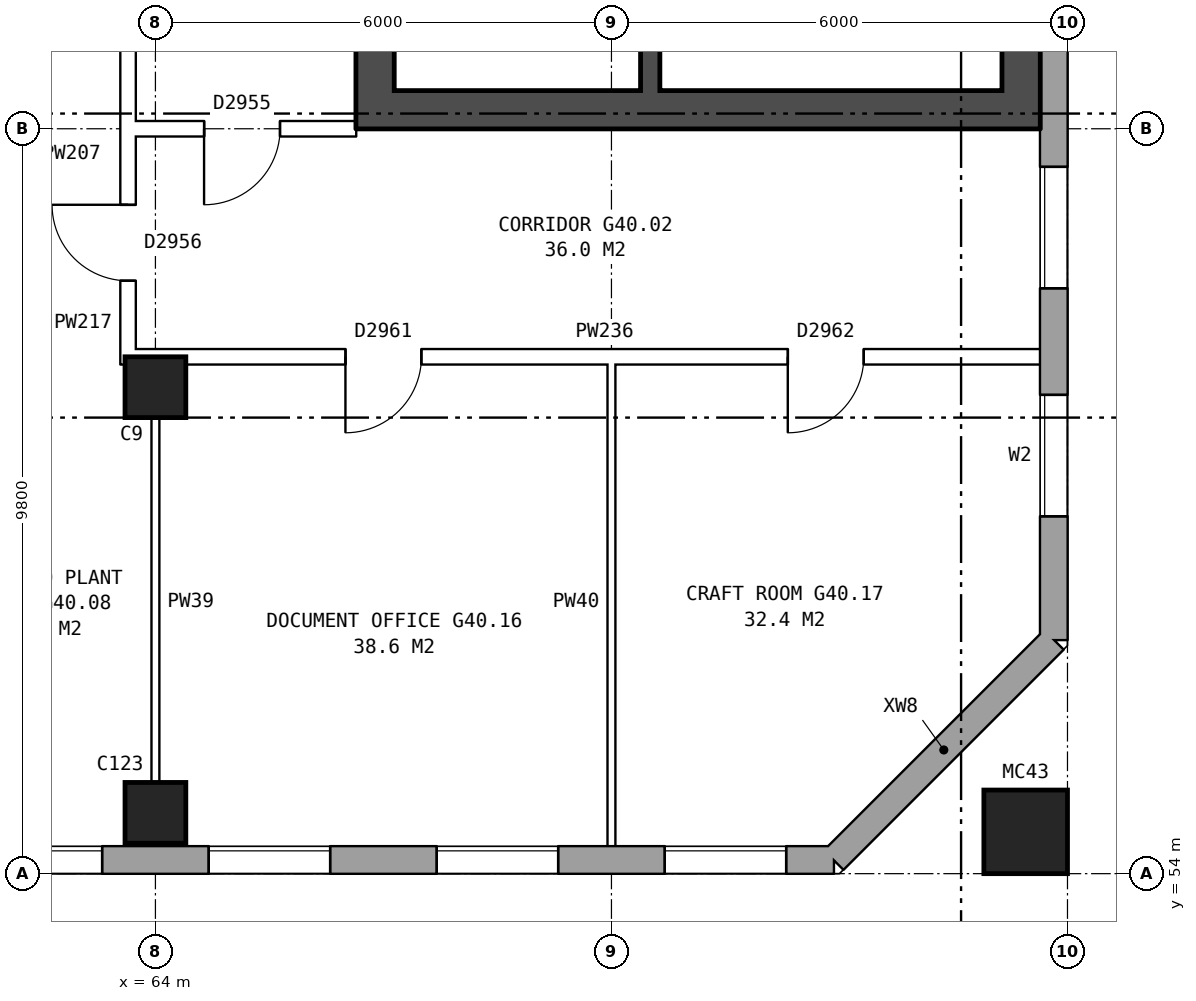
"""IFC4 building model, lengths in metres.
Left out: names, types, materials, properties, quantities, classifications, styles, units other than length and angle.
Written with IfcOpenShell. Run it as: python <this file> out.ifc"""

import sys

from ifc_helpers import new_model, si_unit, direction, frame, frame_2d, origin, origin_2d, place, context, subcontext, project, spatial, rectangle, hollow_rectangle, extrude, element, fill, save


model = new_model("IFC4")
c1 = context("Model", 3, precision=1e-05, world=origin(), true_north=direction((0.0, 1.0)))
c2 = subcontext(c1, "Body", "Model", "MODEL_VIEW")
j1 = project(units=[si_unit("LENGTHUNIT", "METRE"), si_unit("PLANEANGLEUNIT", "RADIAN")], contexts=[c1])
p1 = place(None, origin())
s1 = spatial("IfcSite", under=j1, at=p1, CompositionType="ELEMENT")
p2 = place(p1, origin())
s2 = spatial("IfcBuilding", under=s1, at=p2, CompositionType="ELEMENT")
p3 = place(p2, frame((0.0, 0.0, 142.3)))
s3 = spatial("IfcBuildingStorey", under=s2, at=p3, CompositionType="ELEMENT", Elevation=142.3)
for number, where, z_axis, x_axis in (
    (1, (64.0, 54.8, 0.0), (0.0, 0.0, 1.0), (1.0, 0.0, 0.0)),
    (2, (64.0, 60.4, 0.0), (0.0, 0.0, 1.0), (1.0, 0.0, 0.0)),
):
    element("IfcColumn", number, at=place(p3, frame(where, z_axis=z_axis, x_axis=x_axis)), inside=s3, PredefinedType="COLUMN", context=c2, shape_type="SweptSolid", body=[
        extrude(rectangle(XDim=0.8, YDim=0.8, at=origin_2d()), origin(), (0.0, 0.0, 1.0), 5.6),
    ])
p4 = place(p3, frame((75.45, 54.55, 0.0), z_axis=(0.0, 0.0, 1.0), x_axis=(1.0, 0.0, 0.0)))
e3 = element("IfcColumn", 3, at=p4, inside=s3, PredefinedType="COLUMN", context=c2, shape_type="SweptSolid", body=[
    extrude(hollow_rectangle(XDim=1.1, YDim=1.1, WallThickness=0.06, at=origin_2d()), origin(), (0.0, 0.0, 1.0), 6.2),
])
p5 = place(p3, frame((31.575, 54.18, 0.0), z_axis=(0.0, 0.0, 1.0), x_axis=(1.0, 0.0, 0.0)))
e4 = element("IfcWall", 4, at=p5, inside=s3, PredefinedType="STANDARD", context=c2, shape_type="SweptSolid", body=[
    extrude(rectangle(XDim=41.351, YDim=0.36, at=frame_2d((20.675, 0.0))), origin(), (0.0, 0.0, 1.0), 5.6),
])
p6 = place(p5, frame((3.125, 0.0, 0.15)))
e5 = element("IfcOpeningElement", 5, at=p6, cuts=e4, PredefinedType="OPENING", context=c2, shape_type="SweptSolid", body=[
    extrude(rectangle(XDim=1.6, YDim=2.4, at=frame_2d((0.8, 1.2))), frame((0.0, 0.19, 0.0), z_axis=(0.0, -1.0, 0.0), x_axis=(1.0, 0.0, 0.0)), (0.0, 0.0, 1.0), 0.38),
])
p7 = place(p5, frame((6.125, 0.0, 0.15)))
e6 = element("IfcOpeningElement", 6, at=p7, cuts=e4, PredefinedType="OPENING", context=c2, shape_type="SweptSolid", body=[
    extrude(rectangle(XDim=1.6, YDim=2.4, at=frame_2d((0.8, 1.2))), frame((0.0, 0.19, 0.0), z_axis=(0.0, -1.0, 0.0), x_axis=(1.0, 0.0, 0.0)), (0.0, 0.0, 1.0), 0.38),
])
p8 = place(p5, frame((9.125, 0.0, 0.15)))
e7 = element("IfcOpeningElement", 7, at=p8, cuts=e4, PredefinedType="OPENING", context=c2, shape_type="SweptSolid", body=[
    extrude(rectangle(XDim=1.6, YDim=2.4, at=frame_2d((0.8, 1.2))), frame((0.0, 0.19, 0.0), z_axis=(0.0, -1.0, 0.0), x_axis=(1.0, 0.0, 0.0)), (0.0, 0.0, 1.0), 0.38),
])
p9 = place(p5, frame((12.125, 0.0, 0.15)))
e8 = element("IfcOpeningElement", 8, at=p9, cuts=e4, PredefinedType="OPENING", context=c2, shape_type="SweptSolid", body=[
    extrude(rectangle(XDim=1.6, YDim=2.4, at=frame_2d((0.8, 1.2))), frame((0.0, 0.19, 0.0), z_axis=(0.0, -1.0, 0.0), x_axis=(1.0, 0.0, 0.0)), (0.0, 0.0, 1.0), 0.38),
])
p10 = place(p5, frame((15.125, 0.0, 0.15)))
e9 = element("IfcOpeningElement", 9, at=p10, cuts=e4, PredefinedType="OPENING", context=c2, shape_type="SweptSolid", body=[
    extrude(rectangle(XDim=1.6, YDim=2.4, at=frame_2d((0.8, 1.2))), frame((0.0, 0.19, 0.0), z_axis=(0.0, -1.0, 0.0), x_axis=(1.0, 0.0, 0.0)), (0.0, 0.0, 1.0), 0.38),
])
p11 = place(p5, frame((18.125, 0.0, 0.15)))
e10 = element("IfcOpeningElement", 10, at=p11, cuts=e4, PredefinedType="OPENING", context=c2, shape_type="SweptSolid", body=[
    extrude(rectangle(XDim=1.6, YDim=2.4, at=frame_2d((0.8, 1.2))), frame((0.0, 0.19, 0.0), z_axis=(0.0, -1.0, 0.0), x_axis=(1.0, 0.0, 0.0)), (0.0, 0.0, 1.0), 0.38),
])
p12 = place(p5, frame((21.125, 0.0, 0.15)))
e11 = element("IfcOpeningElement", 11, at=p12, cuts=e4, PredefinedType="OPENING", context=c2, shape_type="SweptSolid", body=[
    extrude(rectangle(XDim=1.6, YDim=2.4, at=frame_2d((0.8, 1.2))), frame((0.0, 0.19, 0.0), z_axis=(0.0, -1.0, 0.0), x_axis=(1.0, 0.0, 0.0)), (0.0, 0.0, 1.0), 0.38),
])
p13 = place(p5, frame((24.125, 0.0, 0.15)))
e12 = element("IfcOpeningElement", 12, at=p13, cuts=e4, PredefinedType="OPENING", context=c2, shape_type="SweptSolid", body=[
    extrude(rectangle(XDim=1.6, YDim=2.4, at=frame_2d((0.8, 1.2))), frame((0.0, 0.19, 0.0), z_axis=(0.0, -1.0, 0.0), x_axis=(1.0, 0.0, 0.0)), (0.0, 0.0, 1.0), 0.38),
])
p14 = place(p5, frame((27.125, 0.0, 0.15)))
e13 = element("IfcOpeningElement", 13, at=p14, cuts=e4, PredefinedType="OPENING", context=c2, shape_type="SweptSolid", body=[
    extrude(rectangle(XDim=1.6, YDim=2.4, at=frame_2d((0.8, 1.2))), frame((0.0, 0.19, 0.0), z_axis=(0.0, -1.0, 0.0), x_axis=(1.0, 0.0, 0.0)), (0.0, 0.0, 1.0), 0.38),
])
p15 = place(p5, frame((30.125, 0.0, 0.15)))
e14 = element("IfcOpeningElement", 14, at=p15, cuts=e4, PredefinedType="OPENING", context=c2, shape_type="SweptSolid", body=[
    extrude(rectangle(XDim=1.6, YDim=2.4, at=frame_2d((0.8, 1.2))), frame((0.0, 0.19, 0.0), z_axis=(0.0, -1.0, 0.0), x_axis=(1.0, 0.0, 0.0)), (0.0, 0.0, 1.0), 0.38),
])
p16 = place(p5, frame((33.125, 0.0, 0.15)))
e15 = element("IfcOpeningElement", 15, at=p16, cuts=e4, PredefinedType="OPENING", context=c2, shape_type="SweptSolid", body=[
    extrude(rectangle(XDim=1.6, YDim=2.4, at=frame_2d((0.8, 1.2))), frame((0.0, 0.19, 0.0), z_axis=(0.0, -1.0, 0.0), x_axis=(1.0, 0.0, 0.0)), (0.0, 0.0, 1.0), 0.38),
])
p17 = place(p5, frame((36.125, 0.0, 0.15)))
e16 = element("IfcOpeningElement", 16, at=p17, cuts=e4, PredefinedType="OPENING", context=c2, shape_type="SweptSolid", body=[
    extrude(rectangle(XDim=1.6, YDim=2.4, at=frame_2d((0.8, 1.2))), frame((0.0, 0.19, 0.0), z_axis=(0.0, -1.0, 0.0), x_axis=(1.0, 0.0, 0.0)), (0.0, 0.0, 1.0), 0.38),
])
p18 = place(p5, frame((39.125, 0.0, 0.15)))
e17 = element("IfcOpeningElement", 17, at=p18, cuts=e4, PredefinedType="OPENING", context=c2, shape_type="SweptSolid", body=[
    extrude(rectangle(XDim=1.6, YDim=2.4, at=frame_2d((0.8, 1.2))), frame((0.0, 0.19, 0.0), z_axis=(0.0, -1.0, 0.0), x_axis=(1.0, 0.0, 0.0)), (0.0, 0.0, 1.0), 0.38),
])
p19 = place(p3, frame((72.925, 54.18, 0.0), z_axis=(0.0, 0.0, 1.0), x_axis=(0.707106781187, 0.707106781187, 0.0)))
e18 = element("IfcWall", 18, at=p19, inside=s3, PredefinedType="STANDARD", context=c2, shape_type="SweptSolid", body=[
    extrude(rectangle(XDim=4.094, YDim=0.36, at=frame_2d((2.047, 0.0))), origin(), (0.0, 0.0, 1.0), 5.6),
])
p20 = place(p3, frame((75.82, 57.075, 0.0), z_axis=(0.0, 0.0, 1.0), x_axis=(0.0, 1.0, 0.0)))
e19 = element("IfcWall", 19, at=p20, inside=s3, PredefinedType="STANDARD", context=c2, shape_type="SweptSolid", body=[
    extrude(rectangle(XDim=25.851, YDim=0.36, at=frame_2d((12.925, 0.0))), origin(), (0.0, 0.0, 1.0), 5.6),
])
p21 = place(p20, frame((1.625, 0.0, 0.15)))
e20 = element("IfcOpeningElement", 20, at=p21, cuts=e19, PredefinedType="OPENING", context=c2, shape_type="SweptSolid", body=[
    extrude(rectangle(XDim=1.6, YDim=2.4, at=frame_2d((0.8, 1.2))), frame((0.0, 0.19, 0.0), z_axis=(0.0, -1.0, 0.0), x_axis=(1.0, 0.0, 0.0)), (0.0, 0.0, 1.0), 0.38),
])
p22 = place(p20, frame((4.625, 0.0, 0.15)))
e21 = element("IfcOpeningElement", 21, at=p22, cuts=e19, PredefinedType="OPENING", context=c2, shape_type="SweptSolid", body=[
    extrude(rectangle(XDim=1.6, YDim=2.4, at=frame_2d((0.8, 1.2))), frame((0.0, 0.19, 0.0), z_axis=(0.0, -1.0, 0.0), x_axis=(1.0, 0.0, 0.0)), (0.0, 0.0, 1.0), 0.38),
])
p23 = place(p20, frame((19.625, 0.0, 0.15)))
e22 = element("IfcOpeningElement", 22, at=p23, cuts=e19, PredefinedType="OPENING", context=c2, shape_type="SweptSolid", body=[
    extrude(rectangle(XDim=1.6, YDim=2.4, at=frame_2d((0.8, 1.2))), frame((0.0, 0.19, 0.0), z_axis=(0.0, -1.0, 0.0), x_axis=(1.0, 0.0, 0.0)), (0.0, 0.0, 1.0), 0.38),
])
p24 = place(p20, frame((22.625, 0.0, 0.15)))
e23 = element("IfcOpeningElement", 23, at=p24, cuts=e19, PredefinedType="OPENING", context=c2, shape_type="SweptSolid", body=[
    extrude(rectangle(XDim=1.6, YDim=2.4, at=frame_2d((0.8, 1.2))), frame((0.0, 0.19, 0.0), z_axis=(0.0, -1.0, 0.0), x_axis=(1.0, 0.0, 0.0)), (0.0, 0.0, 1.0), 0.38),
])
p25 = place(p3, frame((66.89, 63.8, 0.0), z_axis=(0.0, 0.0, 1.0), x_axis=(0.0, 1.0, 0.0)))
e24 = element("IfcWall", 24, at=p25, inside=s3, PredefinedType="SHEAR", context=c2, shape_type="SweptSolid", body=[
    extrude(rectangle(XDim=12.4, YDim=0.5, at=frame_2d((6.2, 0.0))), origin(), (0.0, 0.0, 1.0), 5.6),
])
p26 = place(p25, frame((1.325, 0.0, 0.0)))
e25 = element("IfcOpeningElement", 25, at=p26, cuts=e24, PredefinedType="OPENING", context=c2, shape_type="SweptSolid", body=[
    extrude(rectangle(XDim=1.1, YDim=2.1, at=frame_2d((0.55, 1.05))), frame((0.0, 0.26, 0.0), z_axis=(0.0, -1.0, 0.0), x_axis=(1.0, 0.0, 0.0)), (0.0, 0.0, 1.0), 0.52),
])
p27 = place(p25, frame((3.6, 0.0, 0.0)))
e26 = element("IfcOpeningElement", 26, at=p27, cuts=e24, PredefinedType="OPENING", context=c2, shape_type="SweptSolid", body=[
    extrude(rectangle(XDim=1.1, YDim=2.1, at=frame_2d((0.55, 1.05))), frame((0.0, 0.26, 0.0), z_axis=(0.0, -1.0, 0.0), x_axis=(1.0, 0.0, 0.0)), (0.0, 0.0, 1.0), 0.52),
])
p28 = place(p25, frame((5.8, 0.0, 0.0)))
e27 = element("IfcOpeningElement", 27, at=p28, cuts=e24, PredefinedType="OPENING", context=c2, shape_type="SweptSolid", body=[
    extrude(rectangle(XDim=1.1, YDim=2.1, at=frame_2d((0.55, 1.05))), frame((0.0, 0.26, 0.0), z_axis=(0.0, -1.0, 0.0), x_axis=(1.0, 0.0, 0.0)), (0.0, 0.0, 1.0), 0.52),
])
p29 = place(p25, frame((8.0, 0.0, 0.0)))
e28 = element("IfcOpeningElement", 28, at=p29, cuts=e24, PredefinedType="OPENING", context=c2, shape_type="SweptSolid", body=[
    extrude(rectangle(XDim=1.1, YDim=2.1, at=frame_2d((0.55, 1.05))), frame((0.0, 0.26, 0.0), z_axis=(0.0, -1.0, 0.0), x_axis=(1.0, 0.0, 0.0)), (0.0, 0.0, 1.0), 0.52),
])
p30 = place(p25, frame((9.9, 0.0, 0.0)))
e29 = element("IfcOpeningElement", 29, at=p30, cuts=e24, PredefinedType="OPENING", context=c2, shape_type="SweptSolid", body=[
    extrude(rectangle(XDim=1.1, YDim=2.1, at=frame_2d((0.55, 1.05))), frame((0.0, 0.26, 0.0), z_axis=(0.0, -1.0, 0.0), x_axis=(1.0, 0.0, 0.0)), (0.0, 0.0, 1.0), 0.52),
])
p31 = place(p3, frame((75.39, 63.8, 0.0), z_axis=(0.0, 0.0, 1.0), x_axis=(0.0, 1.0, 0.0)))
e30 = element("IfcWall", 30, at=p31, inside=s3, PredefinedType="SHEAR", context=c2, shape_type="SweptSolid", body=[
    extrude(rectangle(XDim=12.4, YDim=0.5, at=frame_2d((6.2, 0.0))), origin(), (0.0, 0.0, 1.0), 5.6),
])
p32 = place(p3, frame((67.14, 64.05, 0.0), z_axis=(0.0, 0.0, 1.0), x_axis=(1.0, 0.0, 0.0)))
e31 = element("IfcWall", 31, at=p32, inside=s3, PredefinedType="SHEAR", context=c2, shape_type="SweptSolid", body=[
    extrude(rectangle(XDim=8.0, YDim=0.5, at=frame_2d((4.0, 0.0))), origin(), (0.0, 0.0, 1.0), 5.6),
])
p33 = place(p3, frame((70.51, 64.3, 0.0), z_axis=(0.0, 0.0, 1.0), x_axis=(0.0, 1.0, 0.0)))
e32 = element("IfcWall", 32, at=p33, inside=s3, PredefinedType="SHEAR", context=c2, shape_type="SweptSolid", body=[
    extrude(rectangle(XDim=2.425, YDim=0.25, at=frame_2d((1.212, 0.0))), origin(), (0.0, 0.0, 1.0), 5.6),
])
p34 = place(p3, frame((63.64, 63.9, 0.0), z_axis=(0.0, 0.0, 1.0), x_axis=(0.0, 1.0, 0.0)))
e33 = element("IfcWall", 33, at=p34, inside=s3, PredefinedType="PARTITIONING", context=c2, shape_type="SweptSolid", body=[
    extrude(rectangle(XDim=12.2, YDim=0.2, at=frame_2d((6.1, 0.0))), origin(), (0.0, 0.0, 1.0), 5.6),
])
p35 = place(p34, frame((5.1, 0.0, 0.0)))
e34 = element("IfcOpeningElement", 34, at=p35, cuts=e33, PredefinedType="OPENING", context=c2, shape_type="SweptSolid", body=[
    extrude(rectangle(XDim=2.0, YDim=2.1, at=frame_2d((1.0, 1.05))), frame((0.0, 0.11, 0.0), z_axis=(0.0, -1.0, 0.0), x_axis=(1.0, 0.0, 0.0)), (0.0, 0.0, 1.0), 0.22),
])
p36 = place(p3, frame((63.54, 60.8, 0.0), z_axis=(0.0, 0.0, 1.0), x_axis=(1.0, 0.0, 0.0)))
e35 = element("IfcWall", 35, at=p36, inside=s3, PredefinedType="PARTITIONING", context=c2, shape_type="SweptSolid", body=[
    extrude(rectangle(XDim=12.22, YDim=0.2, at=frame_2d((6.11, 0.0))), origin(), (0.0, 0.0, 1.0), 5.6),
])
p37 = place(p36, frame((2.96, 0.0, 0.0)))
e36 = element("IfcOpeningElement", 36, at=p37, cuts=e35, PredefinedType="OPENING", context=c2, shape_type="SweptSolid", body=[
    extrude(rectangle(XDim=1.0, YDim=2.1, at=frame_2d((0.5, 1.05))), frame((0.0, 0.11, 0.0), z_axis=(0.0, -1.0, 0.0), x_axis=(1.0, 0.0, 0.0)), (0.0, 0.0, 1.0), 0.22),
])
p38 = place(p36, frame((8.78, 0.0, 0.0)))
e37 = element("IfcOpeningElement", 37, at=p38, cuts=e35, PredefinedType="OPENING", context=c2, shape_type="SweptSolid", body=[
    extrude(rectangle(XDim=1.0, YDim=2.1, at=frame_2d((0.5, 1.05))), frame((0.0, 0.11, 0.0), z_axis=(0.0, -1.0, 0.0), x_axis=(1.0, 0.0, 0.0)), (0.0, 0.0, 1.0), 0.22),
])
p39 = place(p3, frame((63.54, 63.8, 0.0), z_axis=(0.0, 0.0, 1.0), x_axis=(1.0, 0.0, 0.0)))
e38 = element("IfcWall", 38, at=p39, inside=s3, PredefinedType="PARTITIONING", context=c2, shape_type="SweptSolid", body=[
    extrude(rectangle(XDim=3.1, YDim=0.2, at=frame_2d((1.55, 0.0))), origin(), (0.0, 0.0, 1.0), 5.6),
])
p40 = place(p39, frame((1.1, 0.0, 0.0)))
e39 = element("IfcOpeningElement", 39, at=p40, cuts=e38, PredefinedType="OPENING", context=c2, shape_type="SweptSolid", body=[
    extrude(rectangle(XDim=1.0, YDim=2.1, at=frame_2d((0.5, 1.05))), frame((0.0, 0.11, 0.0), z_axis=(0.0, -1.0, 0.0), x_axis=(1.0, 0.0, 0.0)), (0.0, 0.0, 1.0), 0.22),
])
p41 = place(p3, frame((63.64, 60.7, 0.0), z_axis=(0.0, 0.0, 1.0), x_axis=(0.0, 1.0, 0.0)))
e40 = element("IfcWall", 40, at=p41, inside=s3, PredefinedType="PARTITIONING", context=c2, shape_type="SweptSolid", body=[
    extrude(rectangle(XDim=3.2, YDim=0.2, at=frame_2d((1.6, 0.0))), origin(), (0.0, 0.0, 1.0), 5.6),
])
p42 = place(p41, frame((1.1, 0.0, 0.0)))
e41 = element("IfcOpeningElement", 41, at=p42, cuts=e40, PredefinedType="OPENING", context=c2, shape_type="SweptSolid", body=[
    extrude(rectangle(XDim=1.0, YDim=2.1, at=frame_2d((0.5, 1.05))), frame((0.0, 0.11, 0.0), z_axis=(0.0, -1.0, 0.0), x_axis=(1.0, 0.0, 0.0)), (0.0, 0.0, 1.0), 0.22),
])
for number, where, z_axis, x_axis in (
    (42, (64.0, 54.24, 0.0), (0.0, 0.0, 1.0), (0.0, 1.0, 0.0)),
    (43, (70.0, 54.24, 0.0), (0.0, 0.0, 1.0), (0.0, 1.0, 0.0)),
):
    element("IfcWall", number, at=place(p3, frame(where, z_axis=z_axis, x_axis=x_axis)), inside=s3, PredefinedType="PARTITIONING", context=c2, shape_type="SweptSolid", body=[
        extrude(rectangle(XDim=6.66, YDim=0.1, at=frame_2d((3.33, 0.0))), origin(), (0.0, 0.0, 1.0), 5.6),
    ])
p43 = place(p15, origin())
e44 = element("IfcWindow", 44, at=p43, inside=s3, PartitioningType="SINGLE_PANEL", PredefinedType="WINDOW", context=c2, shape_type="SweptSolid", body=[
    extrude(rectangle(XDim=1.6, YDim=2.4, at=frame_2d((0.8, 1.2))), frame((0.0, 0.15, 0.0), z_axis=(0.0, -1.0, 0.0), x_axis=(1.0, 0.0, 0.0)), (0.0, 0.0, 1.0), 0.06),
])
fill(e14, e44)
p44 = place(p16, origin())
e45 = element("IfcWindow", 45, at=p44, inside=s3, PartitioningType="SINGLE_PANEL", PredefinedType="WINDOW", context=c2, shape_type="SweptSolid", body=[
    extrude(rectangle(XDim=1.6, YDim=2.4, at=frame_2d((0.8, 1.2))), frame((0.0, 0.15, 0.0), z_axis=(0.0, -1.0, 0.0), x_axis=(1.0, 0.0, 0.0)), (0.0, 0.0, 1.0), 0.06),
])
fill(e15, e45)
p45 = place(p17, origin())
e46 = element("IfcWindow", 46, at=p45, inside=s3, PartitioningType="SINGLE_PANEL", PredefinedType="WINDOW", context=c2, shape_type="SweptSolid", body=[
    extrude(rectangle(XDim=1.6, YDim=2.4, at=frame_2d((0.8, 1.2))), frame((0.0, 0.15, 0.0), z_axis=(0.0, -1.0, 0.0), x_axis=(1.0, 0.0, 0.0)), (0.0, 0.0, 1.0), 0.06),
])
fill(e16, e46)
p46 = place(p18, origin())
e47 = element("IfcWindow", 47, at=p46, inside=s3, PartitioningType="SINGLE_PANEL", PredefinedType="WINDOW", context=c2, shape_type="SweptSolid", body=[
    extrude(rectangle(XDim=1.6, YDim=2.4, at=frame_2d((0.8, 1.2))), frame((0.0, 0.15, 0.0), z_axis=(0.0, -1.0, 0.0), x_axis=(1.0, 0.0, 0.0)), (0.0, 0.0, 1.0), 0.06),
])
fill(e17, e47)
p47 = place(p21, origin())
e48 = element("IfcWindow", 48, at=p47, inside=s3, PartitioningType="SINGLE_PANEL", PredefinedType="WINDOW", context=c2, shape_type="SweptSolid", body=[
    extrude(rectangle(XDim=1.6, YDim=2.4, at=frame_2d((0.8, 1.2))), frame((0.0, 0.15, 0.0), z_axis=(0.0, -1.0, 0.0), x_axis=(1.0, 0.0, 0.0)), (0.0, 0.0, 1.0), 0.06),
])
fill(e20, e48)
p48 = place(p22, origin())
e49 = element("IfcWindow", 49, at=p48, inside=s3, PartitioningType="SINGLE_PANEL", PredefinedType="WINDOW", context=c2, shape_type="SweptSolid", body=[
    extrude(rectangle(XDim=1.6, YDim=2.4, at=frame_2d((0.8, 1.2))), frame((0.0, 0.15, 0.0), z_axis=(0.0, -1.0, 0.0), x_axis=(1.0, 0.0, 0.0)), (0.0, 0.0, 1.0), 0.06),
])
fill(e21, e49)
p49 = place(p37, frame((1.0, 0.0, 0.0), z_axis=(0.0, 0.0, 1.0), x_axis=(-1.0, 0.0, 0.0)))
e50 = element("IfcDoor", 50, at=p49, inside=s3, OperationType="SINGLE_SWING_RIGHT", PredefinedType="DOOR", context=c2, shape_type="SweptSolid", body=[
    extrude(rectangle(XDim=1.0, YDim=2.1, at=frame_2d((0.5, 1.05))), frame((0.0, 0.025, 0.0), z_axis=(0.0, -1.0, 0.0), x_axis=(1.0, 0.0, 0.0)), (0.0, 0.0, 1.0), 0.05),
])
fill(e36, e50)
p50 = place(p38, frame((1.0, 0.0, 0.0), z_axis=(0.0, 0.0, 1.0), x_axis=(-1.0, 0.0, 0.0)))
e51 = element("IfcDoor", 51, at=p50, inside=s3, OperationType="SINGLE_SWING_RIGHT", PredefinedType="DOOR", context=c2, shape_type="SweptSolid", body=[
    extrude(rectangle(XDim=1.0, YDim=2.1, at=frame_2d((0.5, 1.05))), frame((0.0, 0.025, 0.0), z_axis=(0.0, -1.0, 0.0), x_axis=(1.0, 0.0, 0.0)), (0.0, 0.0, 1.0), 0.05),
])
fill(e37, e51)
p51 = place(p40, frame((1.0, 0.0, 0.0), z_axis=(0.0, 0.0, 1.0), x_axis=(-1.0, 0.0, 0.0)))
e52 = element("IfcDoor", 52, at=p51, inside=s3, OperationType="SINGLE_SWING_RIGHT", PredefinedType="DOOR", context=c2, shape_type="SweptSolid", body=[
    extrude(rectangle(XDim=1.0, YDim=2.1, at=frame_2d((0.5, 1.05))), frame((0.0, 0.025, 0.0), z_axis=(0.0, -1.0, 0.0), x_axis=(1.0, 0.0, 0.0)), (0.0, 0.0, 1.0), 0.05),
])
fill(e39, e52)
p52 = place(p42, origin())
e53 = element("IfcDoor", 53, at=p52, inside=s3, OperationType="SINGLE_SWING_RIGHT", PredefinedType="DOOR", context=c2, shape_type="SweptSolid", body=[
    extrude(rectangle(XDim=1.0, YDim=2.1, at=frame_2d((0.5, 1.05))), frame((0.0, 0.025, 0.0), z_axis=(0.0, -1.0, 0.0), x_axis=(1.0, 0.0, 0.0)), (0.0, 0.0, 1.0), 0.05),
])
fill(e41, e53)
save(model, sys.argv[1])
